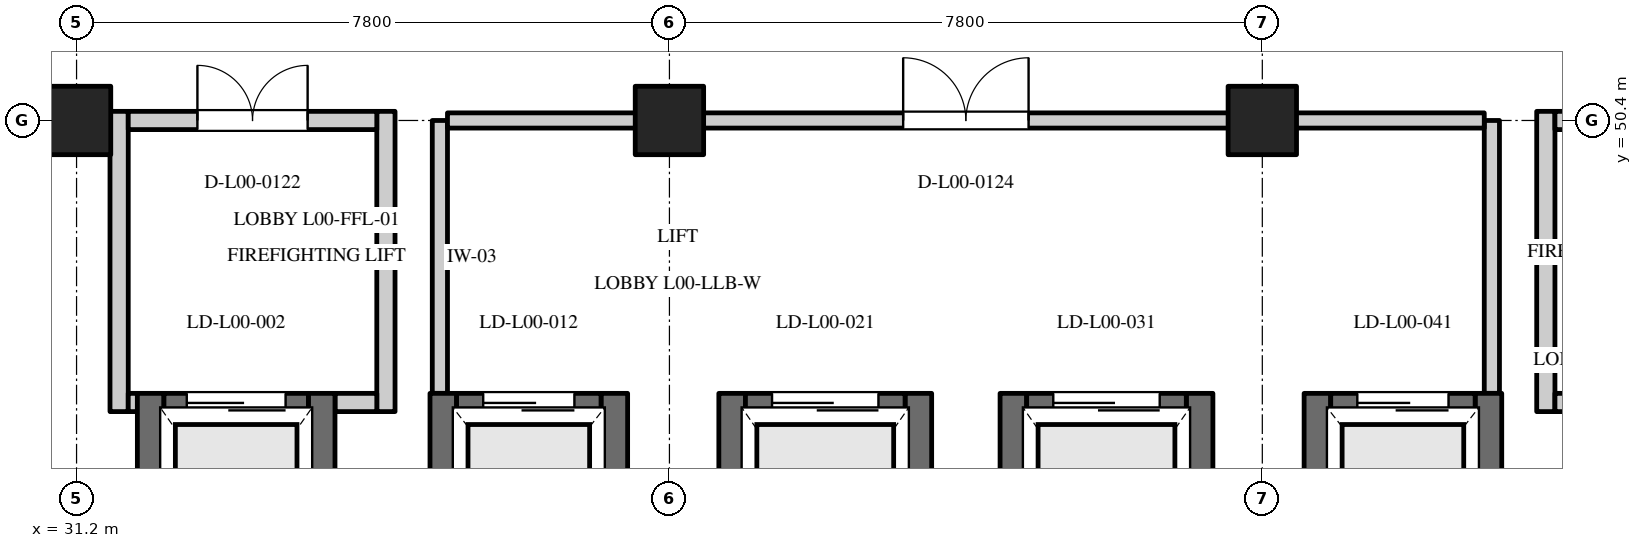
"""IFC4 building model, lengths in metres.
Left out: names, types, materials, properties, quantities, classifications, styles, units other than length and angle.
Written with IfcOpenShell. Run it as: python <this file> out.ifc"""

import sys

from ifc_helpers import new_model, si_unit, direction, frame, frame_2d, origin, origin_2d, place, context, subcontext, project, spatial, rectangle, extrude, element, fill, save


model = new_model("IFC4")
c1 = context("Model", 3, precision=1e-05, world=origin(), true_north=direction((0.0, 1.0)))
c2 = subcontext(c1, "Body", "Model", "MODEL_VIEW")
j1 = project(units=[si_unit("LENGTHUNIT", "METRE"), si_unit("PLANEANGLEUNIT", "RADIAN")], contexts=[c1])
p1 = place(None, origin())
s1 = spatial("IfcSite", under=j1, at=p1, CompositionType="ELEMENT")
p2 = place(p1, origin())
s2 = spatial("IfcBuilding", under=s1, at=p2, CompositionType="ELEMENT")
p3 = place(p2, origin())
s3 = spatial("IfcBuildingStorey", under=s2, at=p3, CompositionType="ELEMENT", Elevation=0.0)
for number, where, z_axis, x_axis in (
    (1, (31.2, 50.4, 0.0), (0.0, 0.0, 1.0), (1.0, 0.0, 0.0)),
    (2, (39.0, 50.4, 0.0), (0.0, 0.0, 1.0), (1.0, 0.0, 0.0)),
    (3, (46.8, 50.4, 0.0), (0.0, 0.0, 1.0), (1.0, 0.0, 0.0)),
):
    element("IfcColumn", number, at=place(p3, frame(where, z_axis=z_axis, x_axis=x_axis)), inside=s3, PredefinedType="COLUMN", context=c2, shape_type="SweptSolid", body=[
        extrude(rectangle(XDim=0.9, YDim=0.9, at=origin_2d()), origin(), (0.0, 0.0, 1.0), 4.8),
    ])
for number, where, z_axis, x_axis in (
    (4, (32.175, 43.06, 0.0), (0.0, 0.0, 1.0), (0.0, 1.0, 0.0)),
    (5, (34.425, 43.06, 0.0), (0.0, 0.0, 1.0), (0.0, 1.0, 0.0)),
):
    element("IfcWall", number, at=place(p3, frame(where, z_axis=z_axis, x_axis=x_axis)), inside=s3, PredefinedType="SHEAR", context=c2, shape_type="SweptSolid", body=[
        extrude(rectangle(XDim=3.75, YDim=0.35, at=frame_2d((1.875, 0.0))), origin(), (0.0, 0.0, 1.0), 4.8),
    ])
p4 = place(p3, frame((32.35, 46.635, 0.0), z_axis=(0.0, 0.0, 1.0), x_axis=(1.0, 0.0, 0.0)))
e6 = element("IfcWall", 6, at=p4, inside=s3, PredefinedType="SHEAR", context=c2, shape_type="SweptSolid", body=[
    extrude(rectangle(XDim=1.9, YDim=0.35, at=frame_2d((0.95, 0.0))), origin(), (0.0, 0.0, 1.0), 4.45),
])
p5 = place(p4, frame((0.3, 0.0, 0.0)))
e7 = element("IfcOpeningElement", 7, at=p5, cuts=e6, PredefinedType="OPENING", context=c2, shape_type="SweptSolid", body=[
    extrude(rectangle(XDim=1.3, YDim=2.2, at=frame_2d((0.65, 1.1))), frame((0.0, 0.187, 0.0), z_axis=(0.0, -1.0, 0.0), x_axis=(1.0, 0.0, 0.0)), (0.0, 0.0, 1.0), 0.374),
])
for number, where, z_axis, x_axis in (
    (8, (36.025, 43.36, 0.0), (0.0, 0.0, 1.0), (0.0, 1.0, 0.0)),
    (9, (38.275, 43.36, 0.0), (0.0, 0.0, 1.0), (0.0, 1.0, 0.0)),
):
    element("IfcWall", number, at=place(p3, frame(where, z_axis=z_axis, x_axis=x_axis)), inside=s3, PredefinedType="SHEAR", context=c2, shape_type="SweptSolid", body=[
        extrude(rectangle(XDim=3.45, YDim=0.35, at=frame_2d((1.725, 0.0))), origin(), (0.0, 0.0, 1.0), 4.8),
    ])
p6 = place(p3, frame((36.2, 46.635, 0.0), z_axis=(0.0, 0.0, 1.0), x_axis=(1.0, 0.0, 0.0)))
e10 = element("IfcWall", 10, at=p6, inside=s3, PredefinedType="SHEAR", context=c2, shape_type="SweptSolid", body=[
    extrude(rectangle(XDim=1.9, YDim=0.35, at=frame_2d((0.95, 0.0))), origin(), (0.0, 0.0, 1.0), 4.45),
])
p7 = place(p6, frame((0.35, 0.0, 0.0)))
e11 = element("IfcOpeningElement", 11, at=p7, cuts=e10, PredefinedType="OPENING", context=c2, shape_type="SweptSolid", body=[
    extrude(rectangle(XDim=1.2, YDim=2.2, at=frame_2d((0.6, 1.1))), frame((0.0, 0.187, 0.0), z_axis=(0.0, -1.0, 0.0), x_axis=(1.0, 0.0, 0.0)), (0.0, 0.0, 1.0), 0.374),
])
for number, where, z_axis, x_axis in (
    (12, (39.825, 42.76, 0.0), (0.0, 0.0, 1.0), (0.0, 1.0, 0.0)),
    (13, (42.275, 42.76, 0.0), (0.0, 0.0, 1.0), (0.0, 1.0, 0.0)),
):
    element("IfcWall", number, at=place(p3, frame(where, z_axis=z_axis, x_axis=x_axis)), inside=s3, PredefinedType="SHEAR", context=c2, shape_type="SweptSolid", body=[
        extrude(rectangle(XDim=4.05, YDim=0.35, at=frame_2d((2.025, 0.0))), origin(), (0.0, 0.0, 1.0), 4.8),
    ])
p8 = place(p3, frame((40.0, 46.635, 0.0), z_axis=(0.0, 0.0, 1.0), x_axis=(1.0, 0.0, 0.0)))
e14 = element("IfcWall", 14, at=p8, inside=s3, PredefinedType="SHEAR", context=c2, shape_type="SweptSolid", body=[
    extrude(rectangle(XDim=2.1, YDim=0.35, at=frame_2d((1.05, 0.0))), origin(), (0.0, 0.0, 1.0), 4.45),
])
p9 = place(p8, frame((0.35, 0.0, 0.0)))
e15 = element("IfcOpeningElement", 15, at=p9, cuts=e14, PredefinedType="OPENING", context=c2, shape_type="SweptSolid", body=[
    extrude(rectangle(XDim=1.4, YDim=2.2, at=frame_2d((0.7, 1.1))), frame((0.0, 0.187, 0.0), z_axis=(0.0, -1.0, 0.0), x_axis=(1.0, 0.0, 0.0)), (0.0, 0.0, 1.0), 0.374),
])
for number, where, z_axis, x_axis in (
    (16, (43.525, 42.76, 0.0), (0.0, 0.0, 1.0), (0.0, 1.0, 0.0)),
    (17, (45.975, 42.76, 0.0), (0.0, 0.0, 1.0), (0.0, 1.0, 0.0)),
):
    element("IfcWall", number, at=place(p3, frame(where, z_axis=z_axis, x_axis=x_axis)), inside=s3, PredefinedType="SHEAR", context=c2, shape_type="SweptSolid", body=[
        extrude(rectangle(XDim=4.05, YDim=0.35, at=frame_2d((2.025, 0.0))), origin(), (0.0, 0.0, 1.0), 4.8),
    ])
p10 = place(p3, frame((43.7, 46.635, 0.0), z_axis=(0.0, 0.0, 1.0), x_axis=(1.0, 0.0, 0.0)))
e18 = element("IfcWall", 18, at=p10, inside=s3, PredefinedType="SHEAR", context=c2, shape_type="SweptSolid", body=[
    extrude(rectangle(XDim=2.1, YDim=0.35, at=frame_2d((1.05, 0.0))), origin(), (0.0, 0.0, 1.0), 4.45),
])
p11 = place(p10, frame((0.35, 0.0, 0.0)))
e19 = element("IfcOpeningElement", 19, at=p11, cuts=e18, PredefinedType="OPENING", context=c2, shape_type="SweptSolid", body=[
    extrude(rectangle(XDim=1.4, YDim=2.2, at=frame_2d((0.7, 1.1))), frame((0.0, 0.187, 0.0), z_axis=(0.0, -1.0, 0.0), x_axis=(1.0, 0.0, 0.0)), (0.0, 0.0, 1.0), 0.374),
])
for number, where, z_axis, x_axis in (
    (20, (47.525, 43.36, 0.0), (0.0, 0.0, 1.0), (0.0, 1.0, 0.0)),
    (21, (49.775, 43.36, 0.0), (0.0, 0.0, 1.0), (0.0, 1.0, 0.0)),
):
    element("IfcWall", number, at=place(p3, frame(where, z_axis=z_axis, x_axis=x_axis)), inside=s3, PredefinedType="SHEAR", context=c2, shape_type="SweptSolid", body=[
        extrude(rectangle(XDim=3.45, YDim=0.35, at=frame_2d((1.725, 0.0))), origin(), (0.0, 0.0, 1.0), 4.8),
    ])
p12 = place(p3, frame((47.7, 46.635, 0.0), z_axis=(0.0, 0.0, 1.0), x_axis=(1.0, 0.0, 0.0)))
e22 = element("IfcWall", 22, at=p12, inside=s3, PredefinedType="SHEAR", context=c2, shape_type="SweptSolid", body=[
    extrude(rectangle(XDim=1.9, YDim=0.35, at=frame_2d((0.95, 0.0))), origin(), (0.0, 0.0, 1.0), 4.45),
])
p13 = place(p12, frame((0.35, 0.0, 0.0)))
e23 = element("IfcOpeningElement", 23, at=p13, cuts=e22, PredefinedType="OPENING", context=c2, shape_type="SweptSolid", body=[
    extrude(rectangle(XDim=1.2, YDim=2.2, at=frame_2d((0.6, 1.1))), frame((0.0, 0.187, 0.0), z_axis=(0.0, -1.0, 0.0), x_axis=(1.0, 0.0, 0.0)), (0.0, 0.0, 1.0), 0.374),
])
for number, where, z_axis, x_axis in (
    (24, (31.76, 46.57, 0.0), (0.0, 0.0, 1.0), (0.0, 1.0, 0.0)),
    (25, (35.27, 46.57, 0.0), (0.0, 0.0, 1.0), (0.0, 1.0, 0.0)),
):
    element("IfcWall", number, at=place(p3, frame(where, z_axis=z_axis, x_axis=x_axis)), inside=s3, PredefinedType="STANDARD", context=c2, shape_type="SweptSolid", body=[
        extrude(rectangle(XDim=3.95, YDim=0.24, at=frame_2d((1.975, 0.0))), origin(), (0.0, 0.0, 1.0), 3.7),
    ])
p14 = place(p3, frame((31.88, 46.69, 0.0), z_axis=(0.0, 0.0, 1.0), x_axis=(1.0, 0.0, 0.0)))
e26 = element("IfcWall", 26, at=p14, inside=s3, PredefinedType="STANDARD", context=c2, shape_type="SweptSolid", body=[
    extrude(rectangle(XDim=0.12, YDim=0.24, at=frame_2d((0.06, 0.0))), origin(), (0.0, 0.0, 1.0), 3.7),
])
p15 = place(p3, frame((34.6, 46.69, 0.0), z_axis=(0.0, 0.0, 1.0), x_axis=(1.0, 0.0, 0.0)))
e27 = element("IfcWall", 27, at=p15, inside=s3, PredefinedType="STANDARD", context=c2, shape_type="SweptSolid", body=[
    extrude(rectangle(XDim=0.55, YDim=0.24, at=frame_2d((0.275, 0.0))), origin(), (0.0, 0.0, 1.0), 3.7),
])
p16 = place(p3, frame((31.88, 50.4, 0.0), z_axis=(0.0, 0.0, 1.0), x_axis=(1.0, 0.0, 0.0)))
e28 = element("IfcWall", 28, at=p16, inside=s3, PredefinedType="STANDARD", context=c2, shape_type="SweptSolid", body=[
    extrude(rectangle(XDim=3.27, YDim=0.24, at=frame_2d((1.635, 0.0))), origin(), (0.0, 0.0, 1.0), 3.7),
])
p17 = place(p16, frame((0.91, 0.0, 0.0)))
e29 = element("IfcOpeningElement", 29, at=p17, cuts=e28, PredefinedType="OPENING", context=c2, shape_type="SweptSolid", body=[
    extrude(rectangle(XDim=1.45, YDim=2.2, at=frame_2d((0.725, 1.1))), frame((0.0, 0.132, 0.0), z_axis=(0.0, -1.0, 0.0), x_axis=(1.0, 0.0, 0.0)), (0.0, 0.0, 1.0), 0.264),
])
p18 = place(p3, frame((50.53, 46.57, 0.0), z_axis=(0.0, 0.0, 1.0), x_axis=(0.0, 1.0, 0.0)))
e30 = element("IfcWall", 30, at=p18, inside=s3, PredefinedType="STANDARD", context=c2, shape_type="SweptSolid", body=[
    extrude(rectangle(XDim=3.95, YDim=0.24, at=frame_2d((1.975, 0.0))), origin(), (0.0, 0.0, 1.0), 3.7),
])
p19 = place(p3, frame((50.65, 46.69, 0.0), z_axis=(0.0, 0.0, 1.0), x_axis=(1.0, 0.0, 0.0)))
e31 = element("IfcWall", 31, at=p19, inside=s3, PredefinedType="STANDARD", context=c2, shape_type="SweptSolid", body=[
    extrude(rectangle(XDim=0.5, YDim=0.24, at=frame_2d((0.25, 0.0))), origin(), (0.0, 0.0, 1.0), 3.7),
])
p20 = place(p3, frame((50.65, 50.4, 0.0), z_axis=(0.0, 0.0, 1.0), x_axis=(1.0, 0.0, 0.0)))
e32 = element("IfcWall", 32, at=p20, inside=s3, PredefinedType="STANDARD", context=c2, shape_type="SweptSolid", body=[
    extrude(rectangle(XDim=3.37, YDim=0.24, at=frame_2d((1.685, 0.0))), origin(), (0.0, 0.0, 1.0), 3.7),
])
p21 = place(p20, frame((0.96, 0.0, 0.0)))
e33 = element("IfcOpeningElement", 33, at=p21, cuts=e32, PredefinedType="OPENING", context=c2, shape_type="SweptSolid", body=[
    extrude(rectangle(XDim=1.45, YDim=2.2, at=frame_2d((0.725, 1.1))), frame((0.0, 0.132, 0.0), z_axis=(0.0, -1.0, 0.0), x_axis=(1.0, 0.0, 0.0)), (0.0, 0.0, 1.0), 0.264),
])
for number, where, z_axis, x_axis in (
    (34, (35.98, 46.81, 0.0), (0.0, 0.0, 1.0), (0.0, 1.0, 0.0)),
    (35, (49.82, 46.81, 0.0), (0.0, 0.0, 1.0), (0.0, 1.0, 0.0)),
):
    element("IfcWall", number, at=place(p3, frame(where, z_axis=z_axis, x_axis=x_axis)), inside=s3, PredefinedType="STANDARD", context=c2, shape_type="SweptSolid", body=[
        extrude(rectangle(XDim=3.59, YDim=0.2, at=frame_2d((1.795, 0.0))), origin(), (0.0, 0.0, 1.0), 3.7),
    ])
p22 = place(p3, frame((36.08, 50.4, 0.0), z_axis=(0.0, 0.0, 1.0), x_axis=(1.0, 0.0, 0.0)))
e36 = element("IfcWall", 36, at=p22, inside=s3, PredefinedType="STANDARD", context=c2, shape_type="SweptSolid", body=[
    extrude(rectangle(XDim=13.64, YDim=0.2, at=frame_2d((6.82, 0.0))), origin(), (0.0, 0.0, 1.0), 3.7),
])
p23 = place(p22, frame((5.995, 0.0, 0.0)))
e37 = element("IfcOpeningElement", 37, at=p23, cuts=e36, PredefinedType="OPENING", context=c2, shape_type="SweptSolid", body=[
    extrude(rectangle(XDim=1.65, YDim=2.25, at=frame_2d((0.825, 1.125))), frame((0.0, 0.112, 0.0), z_axis=(0.0, -1.0, 0.0), x_axis=(1.0, 0.0, 0.0)), (0.0, 0.0, 1.0), 0.224),
])
p24 = place(p5, origin())
e38 = element("IfcDoor", 38, at=p24, inside=s3, OperationType="SLIDING_TO_LEFT", PredefinedType="DOOR", context=c2, shape_type="SweptSolid", body=[
    extrude(rectangle(XDim=1.3, YDim=2.2, at=frame_2d((0.65, 1.1))), frame((0.0, 0.025, 0.0), z_axis=(0.0, -1.0, 0.0), x_axis=(1.0, 0.0, 0.0)), (0.0, 0.0, 1.0), 0.05),
])
fill(e7, e38)
p25 = place(p7, origin())
e39 = element("IfcDoor", 39, at=p25, inside=s3, OperationType="SLIDING_TO_LEFT", PredefinedType="DOOR", context=c2, shape_type="SweptSolid", body=[
    extrude(rectangle(XDim=1.2, YDim=2.2, at=frame_2d((0.6, 1.1))), frame((0.0, 0.025, 0.0), z_axis=(0.0, -1.0, 0.0), x_axis=(1.0, 0.0, 0.0)), (0.0, 0.0, 1.0), 0.05),
])
fill(e11, e39)
p26 = place(p9, origin())
e40 = element("IfcDoor", 40, at=p26, inside=s3, OperationType="SLIDING_TO_LEFT", PredefinedType="DOOR", context=c2, shape_type="SweptSolid", body=[
    extrude(rectangle(XDim=1.4, YDim=2.2, at=frame_2d((0.7, 1.1))), frame((0.0, 0.025, 0.0), z_axis=(0.0, -1.0, 0.0), x_axis=(1.0, 0.0, 0.0)), (0.0, 0.0, 1.0), 0.05),
])
fill(e15, e40)
p27 = place(p11, origin())
e41 = element("IfcDoor", 41, at=p27, inside=s3, OperationType="SLIDING_TO_LEFT", PredefinedType="DOOR", context=c2, shape_type="SweptSolid", body=[
    extrude(rectangle(XDim=1.4, YDim=2.2, at=frame_2d((0.7, 1.1))), frame((0.0, 0.025, 0.0), z_axis=(0.0, -1.0, 0.0), x_axis=(1.0, 0.0, 0.0)), (0.0, 0.0, 1.0), 0.05),
])
fill(e19, e41)
p28 = place(p13, origin())
e42 = element("IfcDoor", 42, at=p28, inside=s3, OperationType="SLIDING_TO_LEFT", PredefinedType="DOOR", context=c2, shape_type="SweptSolid", body=[
    extrude(rectangle(XDim=1.2, YDim=2.2, at=frame_2d((0.6, 1.1))), frame((0.0, 0.025, 0.0), z_axis=(0.0, -1.0, 0.0), x_axis=(1.0, 0.0, 0.0)), (0.0, 0.0, 1.0), 0.05),
])
fill(e23, e42)
p29 = place(p17, origin())
e43 = element("IfcDoor", 43, at=p29, inside=s3, OperationType="DOUBLE_DOOR_SINGLE_SWING", PredefinedType="DOOR", context=c2, shape_type="SweptSolid", body=[
    extrude(rectangle(XDim=1.45, YDim=2.2, at=frame_2d((0.725, 1.1))), frame((0.0, 0.025, 0.0), z_axis=(0.0, -1.0, 0.0), x_axis=(1.0, 0.0, 0.0)), (0.0, 0.0, 1.0), 0.05),
])
fill(e29, e43)
p30 = place(p23, origin())
e44 = element("IfcDoor", 44, at=p30, inside=s3, OperationType="DOUBLE_DOOR_SINGLE_SWING", PredefinedType="DOOR", context=c2, shape_type="SweptSolid", body=[
    extrude(rectangle(XDim=1.65, YDim=2.25, at=frame_2d((0.825, 1.125))), frame((0.0, 0.025, 0.0), z_axis=(0.0, -1.0, 0.0), x_axis=(1.0, 0.0, 0.0)), (0.0, 0.0, 1.0), 0.05),
])
fill(e37, e44)
save(model, sys.argv[1])
